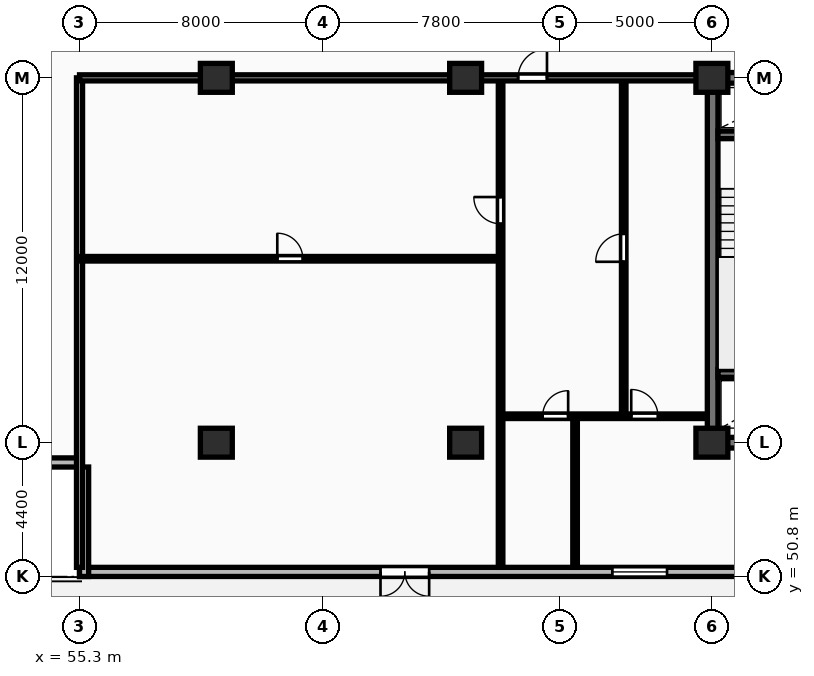
"""IFC4 building model, lengths in metres.
Left out: names, types, materials, properties, quantities, classifications, styles, units other than length and angle.
Written with IfcOpenShell. Run it as: python <this file> out.ifc"""

import sys

from ifc_helpers import new_model, si_unit, direction, frame, frame_2d, origin, origin_2d, place, context, subcontext, project, spatial, rectangle, extrude, element, fill, save


model = new_model("IFC4")
c1 = context("Model", 3, precision=1e-05, world=origin(), true_north=direction((0.0, 1.0)))
c2 = subcontext(c1, "Body", "Model", "MODEL_VIEW")
j1 = project(units=[si_unit("LENGTHUNIT", "METRE"), si_unit("PLANEANGLEUNIT", "RADIAN")], contexts=[c1])
p1 = place(None, origin())
s1 = spatial("IfcSite", under=j1, at=p1, CompositionType="ELEMENT")
p2 = place(p1, origin())
s2 = spatial("IfcBuilding", under=s1, at=p2, CompositionType="ELEMENT")
p3 = place(p2, frame((0.0, 0.0, 24.0)))
s3 = spatial("IfcBuildingStorey", under=s2, at=p3, CompositionType="ELEMENT", Elevation=24.0)
for number, where, z_axis, x_axis in (
    (1, (59.8, 55.2, 0.0), (0.0, 0.0, 1.0), (1.0, 0.0, 0.0)),
    (2, (59.8, 67.2, 0.0), (0.0, 0.0, 1.0), (1.0, 0.0, 0.0)),
    (3, (68.0, 55.2, 0.0), (0.0, 0.0, 1.0), (1.0, 0.0, 0.0)),
    (4, (68.0, 67.2, 0.0), (0.0, 0.0, 1.0), (1.0, 0.0, 0.0)),
    (5, (76.1, 55.2, 0.0), (0.0, 0.0, 1.0), (1.0, 0.0, 0.0)),
    (6, (76.1, 67.2, 0.0), (0.0, 0.0, 1.0), (1.0, 0.0, 0.0)),
):
    element("IfcColumn", number, at=place(p3, frame(where, z_axis=z_axis, x_axis=x_axis)), inside=s3, PredefinedType="COLUMN", context=c2, shape_type="SweptSolid", body=[
        extrude(rectangle(XDim=1.05, YDim=0.95, at=origin_2d()), origin(), (0.0, 0.0, 1.0), 3.25),
    ])
p4 = place(p3, frame((55.3, 50.95, 0.0), z_axis=(0.0, 0.0, 1.0), x_axis=(1.0, 0.0, 0.0)))
e7 = element("IfcWall", 7, at=p4, inside=s3, PredefinedType="STANDARD", context=c2, shape_type="SweptSolid", body=[
    extrude(rectangle(XDim=77.6, YDim=0.3, at=frame_2d((38.8, 0.0))), origin(), (0.0, 0.0, 1.0), 2.97),
])
p5 = place(p4, frame((17.525, 0.0, 0.85)))
e8 = element("IfcOpeningElement", 8, at=p5, cuts=e7, PredefinedType="OPENING", context=c2, shape_type="SweptSolid", body=[
    extrude(rectangle(XDim=1.8, YDim=1.8, at=frame_2d((0.9, 0.9))), frame((0.0, 0.16, 0.0), z_axis=(0.0, -1.0, 0.0), x_axis=(1.0, 0.0, 0.0)), (0.0, 0.0, 1.0), 0.32),
])
p6 = place(p4, frame((60.875, 0.0, 0.85)))
e9 = element("IfcOpeningElement", 9, at=p6, cuts=e7, PredefinedType="OPENING", context=c2, shape_type="SweptSolid", body=[
    extrude(rectangle(XDim=1.8, YDim=1.8, at=frame_2d((0.9, 0.9))), frame((0.0, 0.16, 0.0), z_axis=(0.0, -1.0, 0.0), x_axis=(1.0, 0.0, 0.0)), (0.0, 0.0, 1.0), 0.32),
])
p7 = place(p4, frame((9.9, 0.0, 0.0)))
e10 = element("IfcOpeningElement", 10, at=p7, cuts=e7, PredefinedType="OPENING", context=c2, shape_type="SweptSolid", body=[
    extrude(rectangle(XDim=1.6, YDim=2.2, at=frame_2d((0.8, 1.1))), frame((0.0, 0.16, 0.0), z_axis=(0.0, -1.0, 0.0), x_axis=(1.0, 0.0, 0.0)), (0.0, 0.0, 1.0), 0.32),
])
p8 = place(p3, frame((51.7, 54.55, 0.0), z_axis=(0.0, 0.0, 1.0), x_axis=(1.0, 0.0, 0.0)))
e11 = element("IfcWall", 11, at=p8, inside=s3, PredefinedType="STANDARD", context=c2, shape_type="SweptSolid", body=[
    extrude(rectangle(XDim=3.6, YDim=0.3, at=frame_2d((1.8, 0.0))), origin(), (0.0, 0.0, 1.0), 2.97),
])
p9 = place(p3, frame((55.45, 54.4, 0.0), z_axis=(0.0, 0.0, 1.0), x_axis=(0.0, -1.0, 0.0)))
e12 = element("IfcWall", 12, at=p9, inside=s3, PredefinedType="STANDARD", context=c2, shape_type="SweptSolid", body=[
    extrude(rectangle(XDim=3.6, YDim=0.3, at=frame_2d((1.8, 0.0))), origin(), (0.0, 0.0, 1.0), 2.97),
])
p10 = place(p3, frame((75.95, 55.2, 0.0), z_axis=(0.0, 0.0, 1.0), x_axis=(1.0, 0.0, 0.0)))
e13 = element("IfcWall", 13, at=p10, inside=s3, PredefinedType="SHEAR", context=c2, shape_type="SweptSolid", body=[
    extrude(rectangle(XDim=36.3, YDim=0.35, at=frame_2d((18.15, 0.0))), origin(), (0.0, 0.0, 1.0), 3.25),
])
p11 = place(p3, frame((76.125, 55.375, 0.0), z_axis=(0.0, 0.0, 1.0), x_axis=(0.0, 1.0, 0.0)))
e14 = element("IfcWall", 14, at=p11, inside=s3, PredefinedType="SHEAR", context=c2, shape_type="SweptSolid", body=[
    extrude(rectangle(XDim=11.65, YDim=0.35, at=frame_2d((5.825, 0.0))), origin(), (0.0, 0.0, 1.0), 3.25),
])
p12 = place(p3, frame((75.95, 67.2, 0.0), z_axis=(0.0, 0.0, 1.0), x_axis=(1.0, 0.0, 0.0)))
e15 = element("IfcWall", 15, at=p12, inside=s3, PredefinedType="SHEAR", context=c2, shape_type="SweptSolid", body=[
    extrude(rectangle(XDim=36.3, YDim=0.35, at=frame_2d((18.15, 0.0))), origin(), (0.0, 0.0, 1.0), 3.25),
])
p13 = place(p12, frame((5.25, 0.0, 0.0)))
e16 = element("IfcOpeningElement", 16, at=p13, cuts=e15, PredefinedType="OPENING", context=c2, shape_type="SweptSolid", body=[
    extrude(rectangle(XDim=1.0, YDim=2.15, at=frame_2d((0.5, 1.075))), frame((0.0, 0.185, 0.0), z_axis=(0.0, -1.0, 0.0), x_axis=(1.0, 0.0, 0.0)), (0.0, 0.0, 1.0), 0.37),
])
p14 = place(p12, frame((21.6, 0.0, 0.0)))
e17 = element("IfcOpeningElement", 17, at=p14, cuts=e15, PredefinedType="OPENING", context=c2, shape_type="SweptSolid", body=[
    extrude(rectangle(XDim=1.5, YDim=2.2, at=frame_2d((0.75, 1.1))), frame((0.0, 0.185, 0.0), z_axis=(0.0, -1.0, 0.0), x_axis=(1.0, 0.0, 0.0)), (0.0, 0.0, 1.0), 0.37),
])
p15 = place(p12, frame((30.45, 0.0, 0.0)))
e18 = element("IfcOpeningElement", 18, at=p15, cuts=e15, PredefinedType="OPENING", context=c2, shape_type="SweptSolid", body=[
    extrude(rectangle(XDim=1.0, YDim=2.15, at=frame_2d((0.5, 1.075))), frame((0.0, 0.185, 0.0), z_axis=(0.0, -1.0, 0.0), x_axis=(1.0, 0.0, 0.0)), (0.0, 0.0, 1.0), 0.37),
])
for number, where, z_axis, x_axis in (
    (19, (76.3, 57.475, 0.0), (0.0, 0.0, 1.0), (1.0, 0.0, 0.0)),
    (20, (76.3, 65.325, 0.0), (0.0, 0.0, 1.0), (1.0, 0.0, 0.0)),
):
    element("IfcWall", number, at=place(p3, frame(where, z_axis=z_axis, x_axis=x_axis)), inside=s3, PredefinedType="SHEAR", context=c2, shape_type="SweptSolid", body=[
        extrude(rectangle(XDim=3.24, YDim=0.25, at=frame_2d((1.62, 0.0))), origin(), (0.0, 0.0, 1.0), 3.25),
    ])
p16 = place(p3, frame((55.3, 51.1, 0.0), z_axis=(0.0, 0.0, 1.0), x_axis=(0.0, 1.0, 0.0)))
e21 = element("IfcWall", 21, at=p16, inside=s3, PredefinedType="PARTITIONING", context=c2, shape_type="SweptSolid", body=[
    extrude(rectangle(XDim=16.1, YDim=0.2, at=frame_2d((8.05, 0.0))), origin(), (0.0, 0.0, 1.0), 2.97),
])
p17 = place(p3, frame((55.3, 61.25, 0.0), z_axis=(0.0, 0.0, 1.0), x_axis=(1.0, 0.0, 0.0)))
e22 = element("IfcWall", 22, at=p17, inside=s3, PredefinedType="PARTITIONING", context=c2, shape_type="SweptSolid", body=[
    extrude(rectangle(XDim=13.85, YDim=0.15, at=frame_2d((6.925, 0.0))), origin(), (0.0, 0.0, 1.0), 2.97),
])
p18 = place(p17, frame((6.505, 0.0, 0.0)))
e23 = element("IfcOpeningElement", 23, at=p18, cuts=e22, PredefinedType="OPENING", context=c2, shape_type="SweptSolid", body=[
    extrude(rectangle(XDim=0.84, YDim=2.04, at=frame_2d((0.42, 1.02))), frame((0.0, 0.085, 0.0), z_axis=(0.0, -1.0, 0.0), x_axis=(1.0, 0.0, 0.0)), (0.0, 0.0, 1.0), 0.17),
])
p19 = place(p3, frame((69.15, 51.1, 0.0), z_axis=(0.0, 0.0, 1.0), x_axis=(0.0, 1.0, 0.0)))
e24 = element("IfcWall", 24, at=p19, inside=s3, PredefinedType="PARTITIONING", context=c2, shape_type="SweptSolid", body=[
    extrude(rectangle(XDim=16.05, YDim=0.15, at=frame_2d((8.025, 0.0))), origin(), (0.0, 0.0, 1.0), 2.97),
])
p20 = place(p19, frame((11.3, 0.0, 0.0)))
e25 = element("IfcOpeningElement", 25, at=p20, cuts=e24, PredefinedType="OPENING", context=c2, shape_type="SweptSolid", body=[
    extrude(rectangle(XDim=0.88, YDim=2.06, at=frame_2d((0.44, 1.03))), frame((0.0, 0.085, 0.0), z_axis=(0.0, -1.0, 0.0), x_axis=(1.0, 0.0, 0.0)), (0.0, 0.0, 1.0), 0.17),
])
p21 = place(p3, frame((73.2, 56.07, 0.0), z_axis=(0.0, 0.0, 1.0), x_axis=(0.0, 1.0, 0.0)))
e26 = element("IfcWall", 26, at=p21, inside=s3, PredefinedType="PARTITIONING", context=c2, shape_type="SweptSolid", body=[
    extrude(rectangle(XDim=11.08, YDim=0.15, at=frame_2d((5.54, 0.0))), origin(), (0.0, 0.0, 1.0), 2.97),
])
p22 = place(p21, frame((5.08, 0.0, 0.0)))
e27 = element("IfcOpeningElement", 27, at=p22, cuts=e26, PredefinedType="OPENING", context=c2, shape_type="SweptSolid", body=[
    extrude(rectangle(XDim=0.92, YDim=2.08, at=frame_2d((0.46, 1.04))), frame((0.0, 0.085, 0.0), z_axis=(0.0, -1.0, 0.0), x_axis=(1.0, 0.0, 0.0)), (0.0, 0.0, 1.0), 0.17),
])
p23 = place(p3, frame((71.6, 51.1, 0.0), z_axis=(0.0, 0.0, 1.0), x_axis=(0.0, 1.0, 0.0)))
e28 = element("IfcWall", 28, at=p23, inside=s3, PredefinedType="PARTITIONING", context=c2, shape_type="SweptSolid", body=[
    extrude(rectangle(XDim=4.97, YDim=0.15, at=frame_2d((2.485, 0.0))), origin(), (0.0, 0.0, 1.0), 2.97),
])
p24 = place(p3, frame((69.17, 56.07, 0.0), z_axis=(0.0, 0.0, 1.0), x_axis=(1.0, 0.0, 0.0)))
e29 = element("IfcWall", 29, at=p24, inside=s3, PredefinedType="PARTITIONING", context=c2, shape_type="SweptSolid", body=[
    extrude(rectangle(XDim=6.76, YDim=0.15, at=frame_2d((3.38, 0.0))), origin(), (0.0, 0.0, 1.0), 2.97),
])
p25 = place(p24, frame((1.362, 0.0, 0.0)))
e30 = element("IfcOpeningElement", 30, at=p25, cuts=e29, PredefinedType="OPENING", context=c2, shape_type="SweptSolid", body=[
    extrude(rectangle(XDim=0.84, YDim=2.04, at=frame_2d((0.42, 1.02))), frame((0.0, 0.085, 0.0), z_axis=(0.0, -1.0, 0.0), x_axis=(1.0, 0.0, 0.0)), (0.0, 0.0, 1.0), 0.17),
])
p26 = place(p24, frame((4.277, 0.0, 0.0)))
e31 = element("IfcOpeningElement", 31, at=p26, cuts=e29, PredefinedType="OPENING", context=c2, shape_type="SweptSolid", body=[
    extrude(rectangle(XDim=0.88, YDim=2.06, at=frame_2d((0.44, 1.03))), frame((0.0, 0.085, 0.0), z_axis=(0.0, -1.0, 0.0), x_axis=(1.0, 0.0, 0.0)), (0.0, 0.0, 1.0), 0.17),
])
p27 = place(p3, frame((55.3, 67.2, 0.0), z_axis=(0.0, 0.0, 1.0), x_axis=(1.0, 0.0, 0.0)))
e32 = element("IfcWall", 32, at=p27, inside=s3, PredefinedType="PARTITIONING", context=c2, shape_type="SweptSolid", body=[
    extrude(rectangle(XDim=20.65, YDim=0.2, at=frame_2d((10.325, 0.0))), origin(), (0.0, 0.0, 1.0), 2.37),
])
p28 = place(p27, frame((14.426, 0.0, 0.0)))
e33 = element("IfcOpeningElement", 33, at=p28, cuts=e32, PredefinedType="OPENING", context=c2, shape_type="SweptSolid", body=[
    extrude(rectangle(XDim=0.95, YDim=2.15, at=frame_2d((0.475, 1.075))), frame((0.0, 0.11, 0.0), z_axis=(0.0, -1.0, 0.0), x_axis=(1.0, 0.0, 0.0)), (0.0, 0.0, 1.0), 0.22),
])
p29 = place(p5, origin())
e34 = element("IfcWindow", 34, at=p29, inside=s3, PartitioningType="SINGLE_PANEL", PredefinedType="WINDOW", context=c2, shape_type="SweptSolid", body=[
    extrude(rectangle(XDim=1.8, YDim=1.8, at=frame_2d((0.9, 0.9))), frame((0.0, 0.03, 0.0), z_axis=(0.0, -1.0, 0.0), x_axis=(1.0, 0.0, 0.0)), (0.0, 0.0, 1.0), 0.06),
])
fill(e8, e34)
p30 = place(p7, frame((1.6, 0.0, 0.0), z_axis=(0.0, 0.0, 1.0), x_axis=(-1.0, 0.0, 0.0)))
e35 = element("IfcDoor", 35, at=p30, inside=s3, OperationType="DOUBLE_DOOR_SINGLE_SWING", PredefinedType="DOOR", context=c2, shape_type="SweptSolid", body=[
    extrude(rectangle(XDim=1.6, YDim=2.2, at=frame_2d((0.8, 1.1))), frame((0.0, 0.025, 0.0), z_axis=(0.0, -1.0, 0.0), x_axis=(1.0, 0.0, 0.0)), (0.0, 0.0, 1.0), 0.05),
])
fill(e10, e35)
p31 = place(p18, origin())
e36 = element("IfcDoor", 36, at=p31, inside=s3, OperationType="SINGLE_SWING_LEFT", PredefinedType="DOOR", context=c2, shape_type="SweptSolid", body=[
    extrude(rectangle(XDim=0.84, YDim=2.04, at=frame_2d((0.42, 1.02))), frame((0.0, 0.025, 0.0), z_axis=(0.0, -1.0, 0.0), x_axis=(1.0, 0.0, 0.0)), (0.0, 0.0, 1.0), 0.05),
])
fill(e23, e36)
p32 = place(p20, origin())
e37 = element("IfcDoor", 37, at=p32, inside=s3, OperationType="SINGLE_SWING_RIGHT", PredefinedType="DOOR", context=c2, shape_type="SweptSolid", body=[
    extrude(rectangle(XDim=0.88, YDim=2.06, at=frame_2d((0.44, 1.03))), frame((0.0, 0.025, 0.0), z_axis=(0.0, -1.0, 0.0), x_axis=(1.0, 0.0, 0.0)), (0.0, 0.0, 1.0), 0.05),
])
fill(e25, e37)
p33 = place(p22, origin())
e38 = element("IfcDoor", 38, at=p33, inside=s3, OperationType="SINGLE_SWING_LEFT", PredefinedType="DOOR", context=c2, shape_type="SweptSolid", body=[
    extrude(rectangle(XDim=0.92, YDim=2.08, at=frame_2d((0.46, 1.04))), frame((0.0, 0.025, 0.0), z_axis=(0.0, -1.0, 0.0), x_axis=(1.0, 0.0, 0.0)), (0.0, 0.0, 1.0), 0.05),
])
fill(e27, e38)
p34 = place(p25, origin())
e39 = element("IfcDoor", 39, at=p34, inside=s3, OperationType="SINGLE_SWING_RIGHT", PredefinedType="DOOR", context=c2, shape_type="SweptSolid", body=[
    extrude(rectangle(XDim=0.84, YDim=2.04, at=frame_2d((0.42, 1.02))), frame((0.0, 0.025, 0.0), z_axis=(0.0, -1.0, 0.0), x_axis=(1.0, 0.0, 0.0)), (0.0, 0.0, 1.0), 0.05),
])
fill(e30, e39)
p35 = place(p26, origin())
e40 = element("IfcDoor", 40, at=p35, inside=s3, OperationType="SINGLE_SWING_LEFT", PredefinedType="DOOR", context=c2, shape_type="SweptSolid", body=[
    extrude(rectangle(XDim=0.88, YDim=2.06, at=frame_2d((0.44, 1.03))), frame((0.0, 0.025, 0.0), z_axis=(0.0, -1.0, 0.0), x_axis=(1.0, 0.0, 0.0)), (0.0, 0.0, 1.0), 0.05),
])
fill(e31, e40)
p36 = place(p28, origin())
e41 = element("IfcDoor", 41, at=p36, inside=s3, OperationType="SINGLE_SWING_RIGHT", PredefinedType="DOOR", context=c2, shape_type="SweptSolid", body=[
    extrude(rectangle(XDim=0.95, YDim=2.15, at=frame_2d((0.475, 1.075))), frame((0.0, 0.025, 0.0), z_axis=(0.0, -1.0, 0.0), x_axis=(1.0, 0.0, 0.0)), (0.0, 0.0, 1.0), 0.05),
])
fill(e33, e41)
save(model, sys.argv[1])
